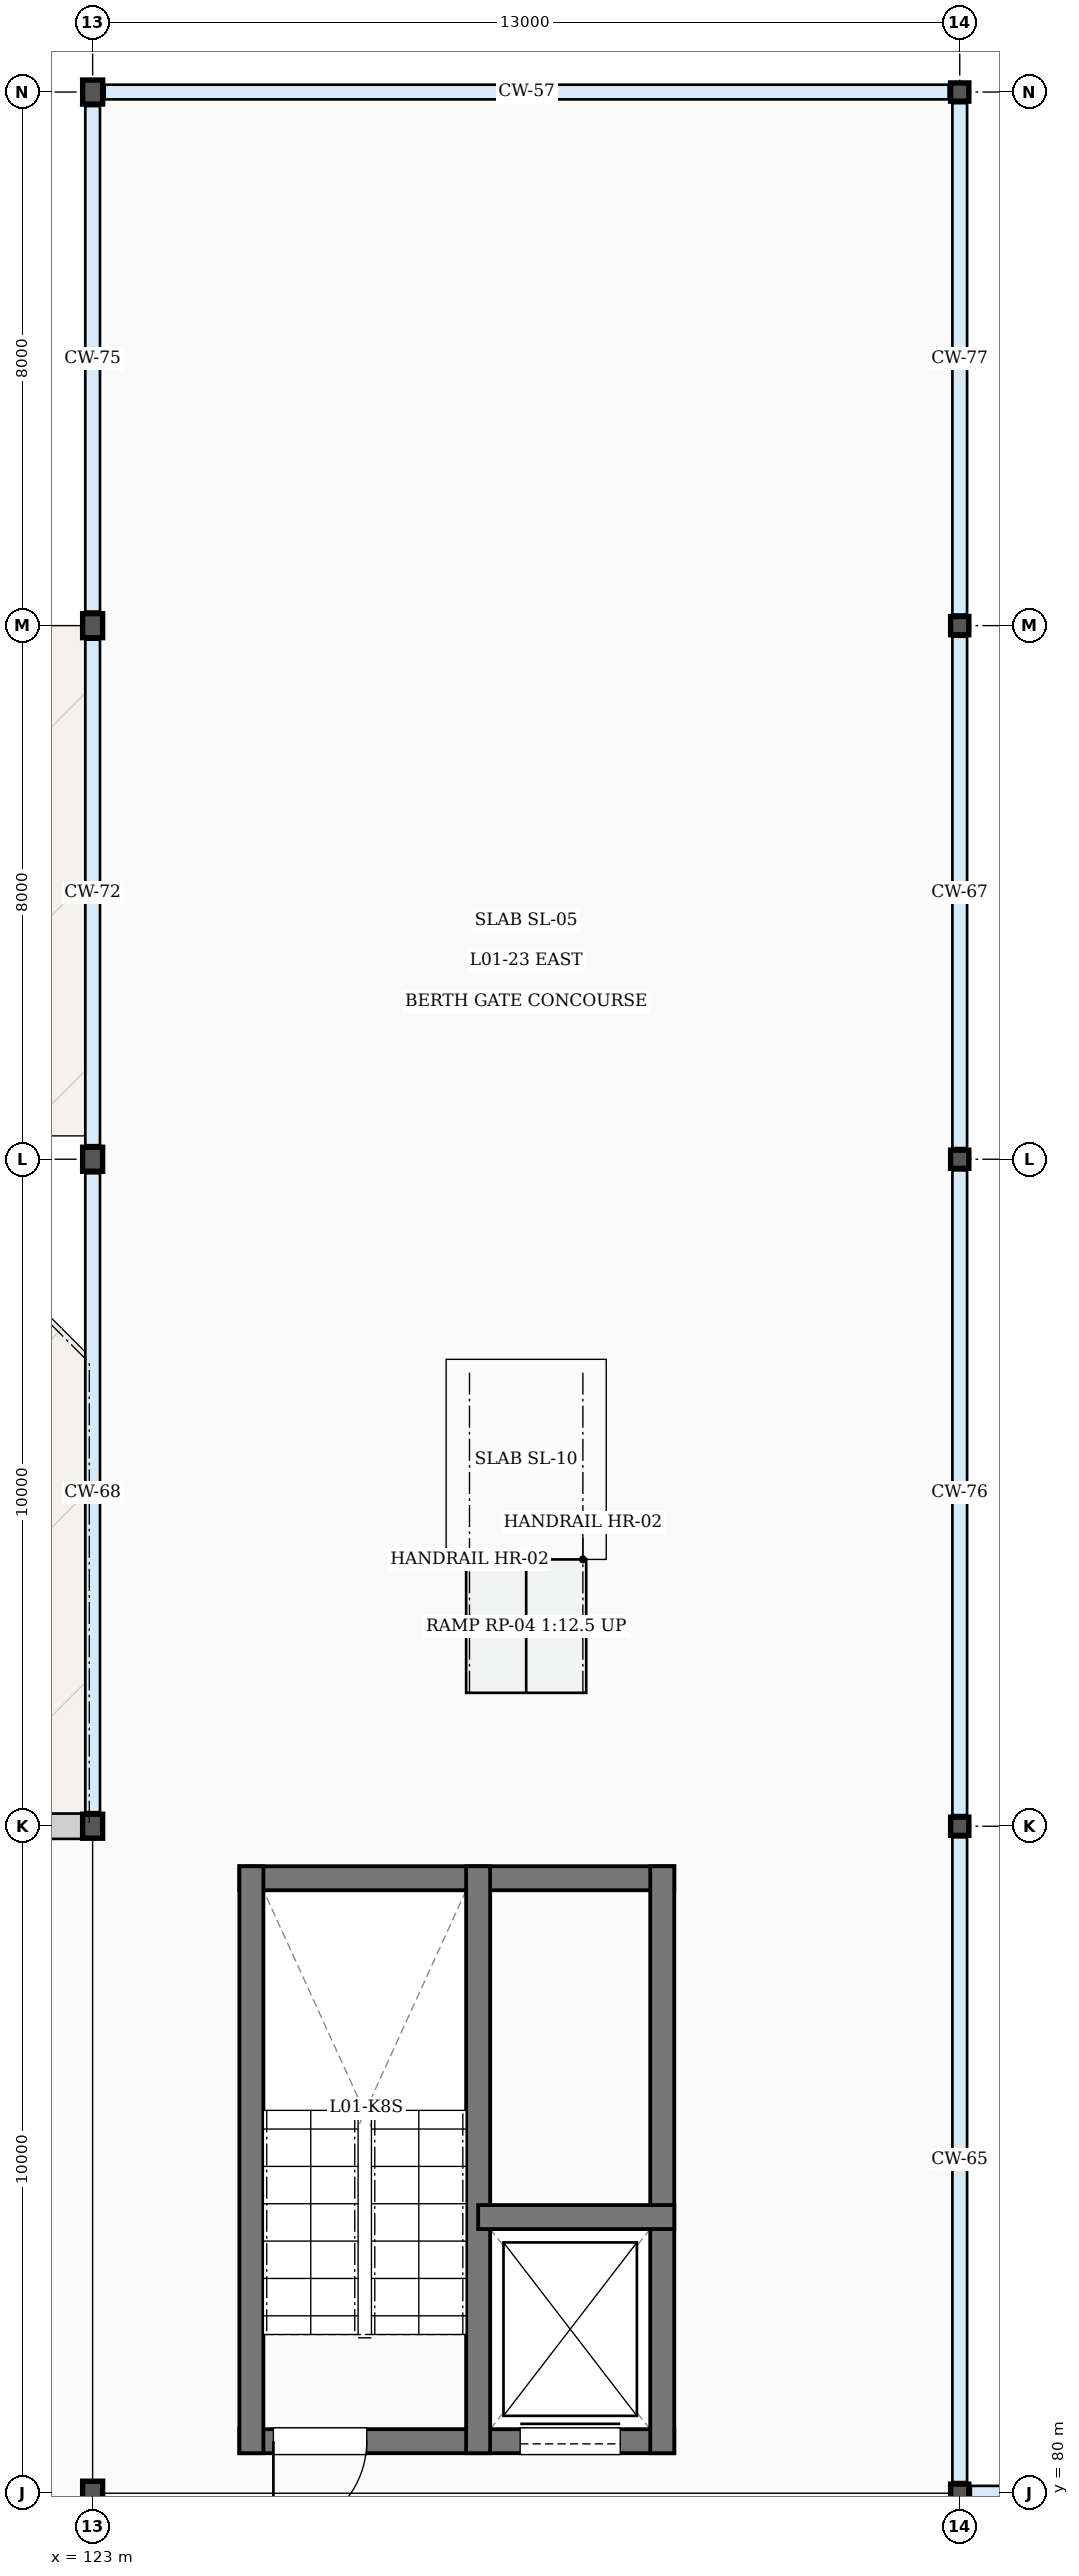
"""IFC4 building model, lengths in metres.
Left out: names, types, materials, properties, quantities, classifications, styles, units other than length and angle.
Written with IfcOpenShell. Run it as: python <this file> out.ifc"""

import sys

from ifc_helpers import new_model, si_unit, direction, frame, frame_2d, origin, origin_2d, place, context, subcontext, project, spatial, rectangle, hollow_circle, i_section, extrude, element, fill, save


model = new_model("IFC4")
c1 = context("Model", 3, precision=1e-05, world=origin(), true_north=direction((0.0, 1.0)))
c2 = subcontext(c1, "Body", "Model", "MODEL_VIEW")
j1 = project(units=[si_unit("LENGTHUNIT", "METRE"), si_unit("PLANEANGLEUNIT", "RADIAN")], contexts=[c1])
p1 = place(None, origin())
s1 = spatial("IfcSite", under=j1, at=p1, CompositionType="ELEMENT")
p2 = place(p1, origin())
s2 = spatial("IfcBuilding", under=s1, at=p2, CompositionType="ELEMENT")
p3 = place(p2, frame((0.0, 0.0, 5.4)))
s3 = spatial("IfcBuildingStorey", under=s2, at=p3, CompositionType="ELEMENT", Elevation=5.4)
for number, where, z_axis, x_axis in (
    (1, (123.0, 80.0, 0.0), (0.0, 0.0, 1.0), (1.0, 0.0, 0.0)),
    (2, (123.0, 90.0, 0.0), (0.0, 0.0, 1.0), (1.0, 0.0, 0.0)),
    (3, (123.0, 100.0, 0.0), (0.0, 0.0, 1.0), (1.0, 0.0, 0.0)),
    (4, (123.0, 108.0, 0.0), (0.0, 0.0, 1.0), (1.0, 0.0, 0.0)),
    (5, (123.0, 116.0, 0.0), (0.0, 0.0, 1.0), (1.0, 0.0, 0.0)),
):
    element("IfcColumn", number, at=place(p3, frame(where, z_axis=z_axis, x_axis=x_axis)), inside=s3, PredefinedType="COLUMN", context=c2, shape_type="SweptSolid", body=[
        extrude(i_section(OverallWidth=0.3, OverallDepth=0.36, WebThickness=0.012, FlangeThickness=0.022, FilletRadius=0.027, at=origin_2d()), origin(), (0.0, 0.0, 1.0), 4.8),
    ])
for number, where, z_axis, x_axis in (
    (6, (136.0, 80.0, 0.0), (0.0, 0.0, 1.0), (1.0, 0.0, 0.0)),
    (7, (136.0, 90.0, 0.0), (0.0, 0.0, 1.0), (1.0, 0.0, 0.0)),
    (8, (136.0, 100.0, 0.0), (0.0, 0.0, 1.0), (1.0, 0.0, 0.0)),
    (9, (136.0, 108.0, 0.0), (0.0, 0.0, 1.0), (1.0, 0.0, 0.0)),
    (10, (136.0, 116.0, 0.0), (0.0, 0.0, 1.0), (1.0, 0.0, 0.0)),
):
    element("IfcColumn", number, at=place(p3, frame(where, z_axis=z_axis, x_axis=x_axis)), inside=s3, PredefinedType="COLUMN", context=c2, shape_type="SweptSolid", body=[
        extrude(hollow_circle(Radius=0.136, WallThickness=0.012, at=origin_2d()), origin(), (0.0, 0.0, 1.0), 4.8),
    ])
p4 = place(p3, frame((113.15, 90.0, 0.0), z_axis=(0.0, 0.0, 1.0), x_axis=(1.0, 0.0, 0.0)))
e11 = element("IfcWall", 11, at=p4, inside=s3, PredefinedType="SOLIDWALL", context=c2, shape_type="SweptSolid", body=[
    extrude(rectangle(XDim=9.7, YDim=0.38, at=frame_2d((4.85, 0.0))), origin(), (0.0, 0.0, 1.0), 3.87),
])
p5 = place(p4, frame((3.95, 0.0, 0.0)))
e12 = element("IfcOpeningElement", 12, at=p5, cuts=e11, PredefinedType="OPENING", context=c2, shape_type="SweptSolid", body=[
    extrude(rectangle(XDim=1.8, YDim=2.35, at=frame_2d((0.9, 1.175))), frame((0.0, 0.2, 0.0), z_axis=(0.0, -1.0, 0.0), x_axis=(1.0, 0.0, 0.0)), (0.0, 0.0, 1.0), 0.4),
])
p6 = place(p3, frame((125.2, 80.78, 0.0), z_axis=(0.0, 0.0, 1.0), x_axis=(1.0, 0.0, 0.0)))
e13 = element("IfcWall", 13, at=p6, inside=s3, PredefinedType="SHEAR", context=c2, shape_type="SweptSolid", body=[
    extrude(rectangle(XDim=6.52, YDim=0.36, at=frame_2d((3.26, 0.0))), origin(), (0.0, 0.0, 1.0), 4.8),
])
p7 = place(p6, frame((0.51, 0.0, 0.0)))
e14 = element("IfcOpeningElement", 14, at=p7, cuts=e13, PredefinedType="OPENING", context=c2, shape_type="SweptSolid", body=[
    extrude(rectangle(XDim=1.4, YDim=2.35, at=frame_2d((0.7, 1.175))), frame((0.0, 0.19, 0.0), z_axis=(0.0, -1.0, 0.0), x_axis=(1.0, 0.0, 0.0)), (0.0, 0.0, 1.0), 0.38),
])
p8 = place(p6, frame((4.21, 0.0, 0.0)))
e15 = element("IfcOpeningElement", 15, at=p8, cuts=e13, PredefinedType="OPENING", context=c2, shape_type="SweptSolid", body=[
    extrude(rectangle(XDim=1.5, YDim=2.4, at=frame_2d((0.75, 1.2))), frame((0.0, 0.19, 0.0), z_axis=(0.0, -1.0, 0.0), x_axis=(1.0, 0.0, 0.0)), (0.0, 0.0, 1.0), 0.38),
])
p9 = place(p3, frame((125.2, 89.22, 0.0), z_axis=(0.0, 0.0, 1.0), x_axis=(1.0, 0.0, 0.0)))
e16 = element("IfcWall", 16, at=p9, inside=s3, PredefinedType="SHEAR", context=c2, shape_type="SweptSolid", body=[
    extrude(rectangle(XDim=6.52, YDim=0.36, at=frame_2d((3.26, 0.0))), origin(), (0.0, 0.0, 1.0), 4.8),
])
for number, where, z_axis, x_axis in (
    (17, (125.38, 80.6, 0.0), (0.0, 0.0, 1.0), (0.0, 1.0, 0.0)),
    (18, (131.54, 80.6, 0.0), (0.0, 0.0, 1.0), (0.0, 1.0, 0.0)),
    (19, (128.78, 80.6, 0.0), (0.0, 0.0, 1.0), (0.0, 1.0, 0.0)),
):
    element("IfcWall", number, at=place(p3, frame(where, z_axis=z_axis, x_axis=x_axis)), inside=s3, PredefinedType="SHEAR", context=c2, shape_type="SweptSolid", body=[
        extrude(rectangle(XDim=8.8, YDim=0.36, at=frame_2d((4.4, 0.0))), origin(), (0.0, 0.0, 1.0), 4.8),
    ])
p10 = place(p3, frame((128.78, 84.14, 0.0), z_axis=(0.0, 0.0, 1.0), x_axis=(1.0, 0.0, 0.0)))
e20 = element("IfcWall", 20, at=p10, inside=s3, PredefinedType="SHEAR", context=c2, shape_type="SweptSolid", body=[
    extrude(rectangle(XDim=2.94, YDim=0.36, at=frame_2d((1.47, 0.0))), origin(), (0.0, 0.0, 1.0), 4.8),
])
p11 = place(p7, origin())
e21 = element("IfcDoor", 21, at=p11, inside=s3, OperationType="SINGLE_SWING_LEFT", PredefinedType="DOOR", context=c2, shape_type="SweptSolid", body=[
    extrude(rectangle(XDim=1.4, YDim=2.35, at=frame_2d((0.7, 1.175))), frame((0.0, 0.025, 0.0), z_axis=(0.0, -1.0, 0.0), x_axis=(1.0, 0.0, 0.0)), (0.0, 0.0, 1.0), 0.05),
])
fill(e14, e21)
p12 = place(p8, origin())
e22 = element("IfcDoor", 22, at=p12, inside=s3, OperationType="SLIDING_TO_LEFT", PredefinedType="DOOR", context=c2, shape_type="SweptSolid", body=[
    extrude(rectangle(XDim=1.5, YDim=2.4, at=frame_2d((0.75, 1.2))), frame((0.0, 0.025, 0.0), z_axis=(0.0, -1.0, 0.0), x_axis=(1.0, 0.0, 0.0)), (0.0, 0.0, 1.0), 0.05),
])
fill(e15, e22)
save(model, sys.argv[1])
